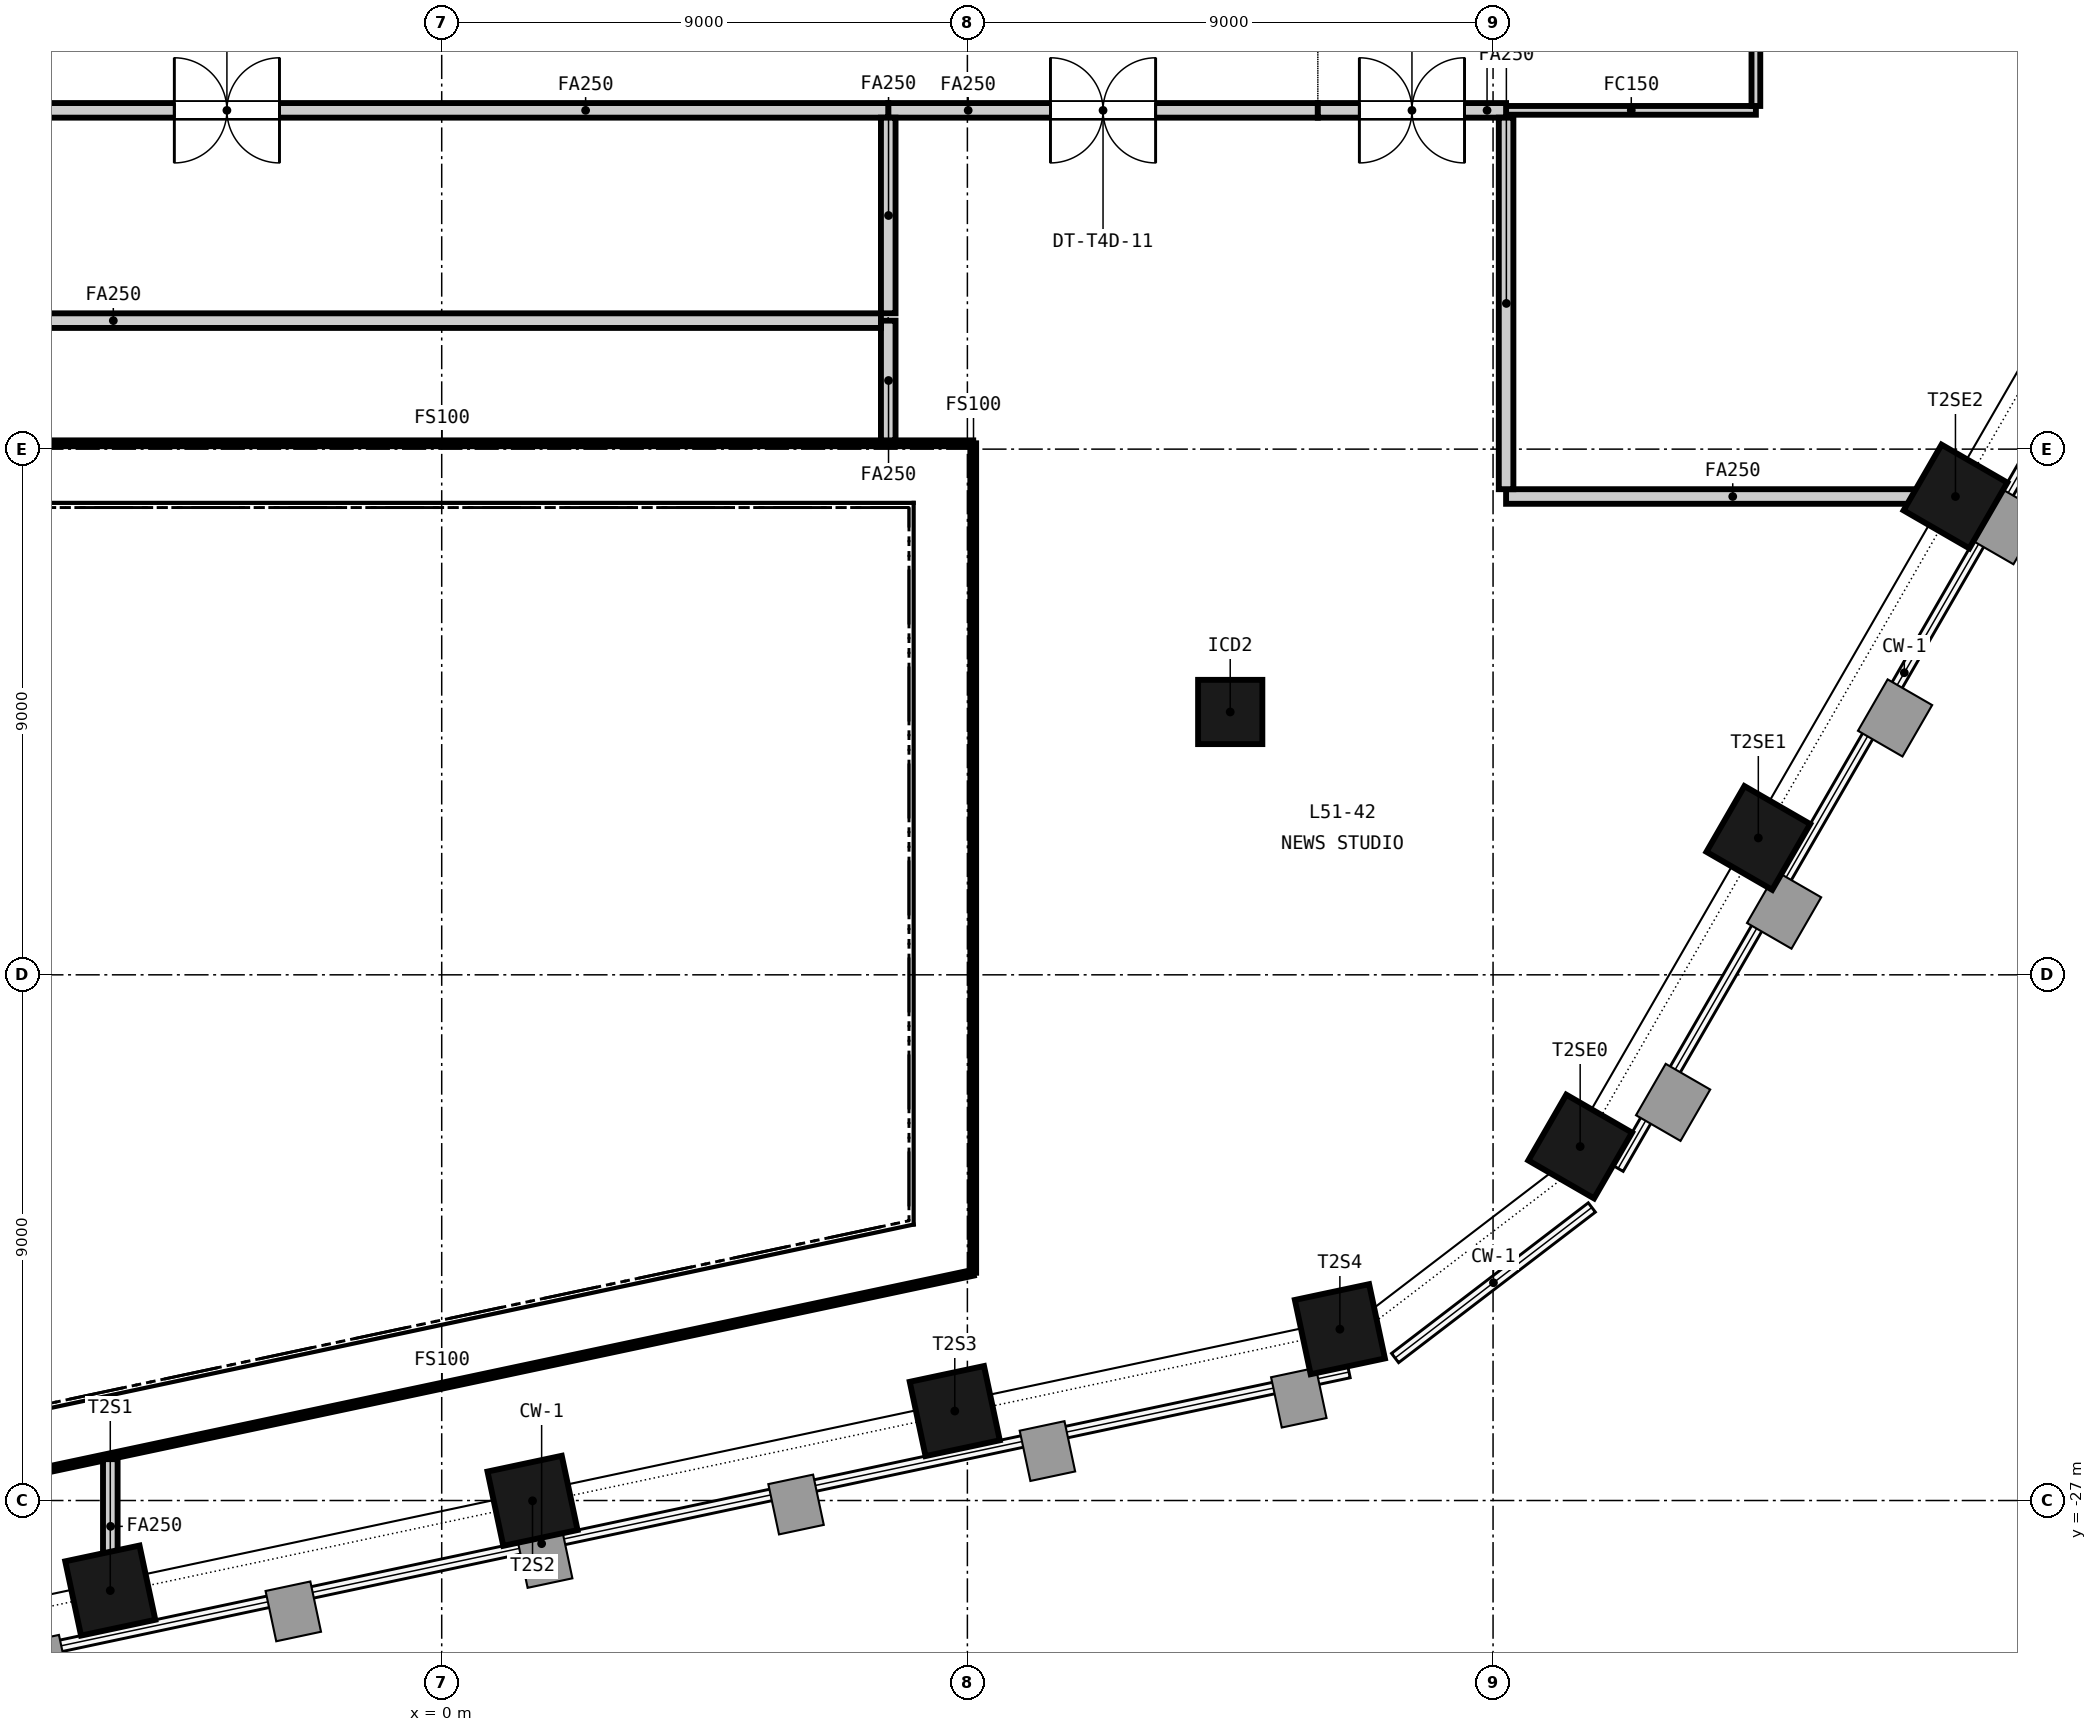
"""IFC4 building model, lengths in metres.
Left out: names, types, materials, properties, quantities, classifications, styles, units other than length and angle.
Written with IfcOpenShell. Run it as: python <this file> out.ifc"""

import sys

from ifc_helpers import new_model, si_unit, direction, frame, frame_2d, origin, origin_2d, place, context, subcontext, project, spatial, rectangle, extrude, element, fill, save


model = new_model("IFC4")
c1 = context("Model", 3, precision=1e-05, world=origin(), true_north=direction((0.0, 1.0)))
c2 = subcontext(c1, "Body", "Model", "MODEL_VIEW")
j1 = project(units=[si_unit("LENGTHUNIT", "METRE"), si_unit("PLANEANGLEUNIT", "RADIAN")], contexts=[c1])
p1 = place(None, origin())
s1 = spatial("IfcSite", under=j1, at=p1, CompositionType="ELEMENT")
p2 = place(p1, origin())
s2 = spatial("IfcBuilding", under=s1, at=p2, CompositionType="ELEMENT")
p3 = place(p2, frame((0.0, 0.0, 203.65)))
s3 = spatial("IfcBuildingStorey", under=s2, at=p3, CompositionType="ELEMENT", Elevation=203.65)
for number, where, z_axis, x_axis in (
    (1, (-5.675, -28.542, -0.15), (0.0, 0.0, 1.0), (0.978, 0.208, 0.0)),
    (2, (1.555, -27.005, -0.15), (0.0, 0.0, 1.0), (0.978, 0.208, 0.0)),
    (3, (8.784, -25.468, -0.15), (0.0, 0.0, 1.0), (0.978, 0.208, 0.0)),
    (4, (15.378, -24.067, -0.15), (0.0, 0.0, 1.0), (0.978, 0.208, 0.0)),
    (5, (19.491, -20.94, -0.15), (0.0, 0.0, 1.0), (0.5, 0.866, 0.0)),
    (6, (22.542, -15.657, -0.15), (0.0, 0.0, 1.0), (0.5, 0.866, 0.0)),
    (7, (25.917, -9.811, -0.15), (0.0, 0.0, 1.0), (0.5, 0.866, 0.0)),
):
    element("IfcColumn", number, at=place(p3, frame(where, z_axis=z_axis, x_axis=x_axis)), inside=s3, PredefinedType="COLUMN", context=c2, shape_type="SweptSolid", body=[
        extrude(rectangle(XDim=1.3, YDim=1.3, at=origin_2d()), origin(), (0.0, 0.0, 1.0), 3.5),
    ])
p4 = place(p3, frame((13.5, -13.5, -0.15), z_axis=(0.0, 0.0, 1.0), x_axis=(1.0, 0.0, 0.0)))
e8 = element("IfcColumn", 8, at=p4, inside=s3, PredefinedType="COLUMN", context=c2, shape_type="SweptSolid", body=[
    extrude(rectangle(XDim=1.1, YDim=1.1, at=origin_2d()), origin(), (0.0, 0.0, 1.0), 3.5),
])
p5 = place(p3, frame((15.0, -3.2, 0.0), z_axis=(0.0, 0.0, 1.0), x_axis=(-1.0, 0.0, 0.0)))
e9 = element("IfcWall", 9, at=p5, inside=s3, PredefinedType="PARTITIONING", context=c2, shape_type="SweptSolid", body=[
    extrude(rectangle(XDim=7.355, YDim=0.25, at=frame_2d((3.677, 0.0))), origin(), (0.0, 0.0, 1.0), 2.591),
])
p6 = place(p5, frame((2.778, 0.0, 0.0)))
e10 = element("IfcOpeningElement", 10, at=p6, cuts=e9, PredefinedType="OPENING", context=c2, shape_type="SweptSolid", body=[
    extrude(rectangle(XDim=1.8, YDim=2.1, at=frame_2d((0.9, 1.05))), frame((0.0, 0.135, 0.0), z_axis=(0.0, -1.0, 0.0), x_axis=(1.0, 0.0, 0.0)), (0.0, 0.0, 1.0), 0.27),
])
p7 = place(p3, frame((7.645, -3.2, 0.0), z_axis=(0.0, 0.0, 1.0), x_axis=(-1.0, 0.0, 0.0)))
e11 = element("IfcWall", 11, at=p7, inside=s3, PredefinedType="PARTITIONING", context=c2, shape_type="SweptSolid", body=[
    extrude(rectangle(XDim=22.645, YDim=0.25, at=frame_2d((11.323, 0.0))), origin(), (0.0, 0.0, 1.0), 2.591),
])
p8 = place(p7, frame((10.423, 0.0, 0.0)))
e12 = element("IfcOpeningElement", 12, at=p8, cuts=e11, PredefinedType="OPENING", context=c2, shape_type="SweptSolid", body=[
    extrude(rectangle(XDim=1.8, YDim=2.1, at=frame_2d((0.9, 1.05))), frame((0.0, 0.135, 0.0), z_axis=(0.0, -1.0, 0.0), x_axis=(1.0, 0.0, 0.0)), (0.0, 0.0, 1.0), 0.27),
])
p9 = place(p3, frame((22.5, -3.2, 0.0), z_axis=(0.0, 0.0, 1.0), x_axis=(-1.0, 0.0, 0.0)))
e13 = element("IfcWall", 13, at=p9, inside=s3, PredefinedType="PARTITIONING", context=c2, shape_type="SweptSolid", body=[
    extrude(rectangle(XDim=4.277, YDim=0.15, at=frame_2d((2.139, 0.0))), origin(), (0.0, 0.0, 1.0), 2.591),
])
p10 = place(p3, frame((22.5, 0.0, 0.0), z_axis=(0.0, 0.0, 1.0), x_axis=(0.0, -1.0, 0.0)))
e14 = element("IfcWall", 14, at=p10, inside=s3, PredefinedType="PARTITIONING", context=c2, shape_type="SweptSolid", body=[
    extrude(rectangle(XDim=3.125, YDim=0.15, at=frame_2d((1.562, 0.0))), origin(), (0.0, 0.0, 1.0), 2.591),
])
p11 = place(p3, frame((18.223, -3.2, 0.0), z_axis=(0.0, 0.0, 1.0), x_axis=(-1.0, 0.0, 0.0)))
e15 = element("IfcWall", 15, at=p11, inside=s3, PredefinedType="PARTITIONING", context=c2, shape_type="SweptSolid", body=[
    extrude(rectangle(XDim=3.223, YDim=0.25, at=frame_2d((1.611, 0.0))), origin(), (0.0, 0.0, 1.0), 2.591),
])
p12 = place(p11, frame((0.711, 0.0, 0.0)))
e16 = element("IfcOpeningElement", 16, at=p12, cuts=e15, PredefinedType="OPENING", context=c2, shape_type="SweptSolid", body=[
    extrude(rectangle(XDim=1.8, YDim=2.1, at=frame_2d((0.9, 1.05))), frame((0.0, 0.135, 0.0), z_axis=(0.0, -1.0, 0.0), x_axis=(1.0, 0.0, 0.0)), (0.0, 0.0, 1.0), 0.27),
])
p13 = place(p3, frame((18.223, -9.811, 0.0), z_axis=(0.0, 0.0, 1.0), x_axis=(1.0, 0.0, 0.0)))
e17 = element("IfcWall", 17, at=p13, inside=s3, PredefinedType="PARTITIONING", context=c2, shape_type="SweptSolid", body=[
    extrude(rectangle(XDim=7.751, YDim=0.25, at=frame_2d((3.875, 0.0))), origin(), (0.0, 0.0, 1.0), 2.591),
])
p14 = place(p3, frame((-5.674, -28.593, 0.0), z_axis=(0.0, 0.0, 1.0), x_axis=(0.0, 1.0, 0.0)))
e18 = element("IfcWall", 18, at=p14, inside=s3, PredefinedType="PARTITIONING", context=c2, shape_type="SweptSolid", body=[
    extrude(rectangle(XDim=2.301, YDim=0.25, at=frame_2d((1.15, 0.0))), origin(), (0.0, 0.0, 1.0), 2.591),
])
p15 = place(p3, frame((7.645, -8.85, 0.0), z_axis=(0.0, 0.0, 1.0), x_axis=(0.0, 1.0, 0.0)))
e19 = element("IfcWall", 19, at=p15, inside=s3, PredefinedType="PARTITIONING", context=c2, shape_type="SweptSolid", body=[
    extrude(rectangle(XDim=2.05, YDim=0.25, at=frame_2d((1.025, 0.0))), origin(), (0.0, 0.0, 1.0), 2.591),
])
p16 = place(p3, frame((18.223, -9.686, 0.0), z_axis=(0.0, 0.0, 1.0), x_axis=(0.0, 1.0, 0.0)))
e20 = element("IfcWall", 20, at=p16, inside=s3, PredefinedType="PARTITIONING", context=c2, shape_type="SweptSolid", body=[
    extrude(rectangle(XDim=6.361, YDim=0.25, at=frame_2d((3.181, 0.0))), origin(), (0.0, 0.0, 1.0), 2.591),
])
p17 = place(p3, frame((-18.775, -6.8, 0.0), z_axis=(0.0, 0.0, 1.0), x_axis=(1.0, 0.0, 0.0)))
e21 = element("IfcWall", 21, at=p17, inside=s3, PredefinedType="PARTITIONING", context=c2, shape_type="SweptSolid", body=[
    extrude(rectangle(XDim=26.295, YDim=0.25, at=frame_2d((13.147, 0.0))), origin(), (0.0, 0.0, 1.0), 2.591),
])
p18 = place(p3, frame((7.645, -6.675, 0.0), z_axis=(0.0, 0.0, 1.0), x_axis=(0.0, 1.0, 0.0)))
e22 = element("IfcWall", 22, at=p18, inside=s3, PredefinedType="PARTITIONING", context=c2, shape_type="SweptSolid", body=[
    extrude(rectangle(XDim=3.35, YDim=0.25, at=frame_2d((1.675, 0.0))), origin(), (0.0, 0.0, 1.0), 2.591),
])
p19 = place(p3, frame((-9.1, -8.9, 0.0), z_axis=(0.0, 0.0, 1.0), x_axis=(1.0, 0.0, 0.0)))
e23 = element("IfcWall", 23, at=p19, inside=s3, PredefinedType="PARTITIONING", context=c2, shape_type="SweptSolid", body=[
    extrude(rectangle(XDim=18.2, YDim=0.1, at=frame_2d((9.1, 0.0))), origin(), (0.0, 0.0, 1.0), 2.591),
])
p20 = place(p3, frame((9.1, -8.9, 0.0), z_axis=(0.0, 0.0, 1.0), x_axis=(0.0, -1.0, 0.0)))
e24 = element("IfcWall", 24, at=p20, inside=s3, PredefinedType="PARTITIONING", context=c2, shape_type="SweptSolid", body=[
    extrude(rectangle(XDim=14.201, YDim=0.1, at=frame_2d((7.101, 0.0))), origin(), (0.0, 0.0, 1.0), 2.591),
])
p21 = place(p3, frame((9.1, -23.101, 0.0), z_axis=(0.0, 0.0, 1.0), x_axis=(-0.978146710971, -0.207915876778, 0.0)))
e25 = element("IfcWall", 25, at=p21, inside=s3, PredefinedType="PARTITIONING", context=c2, shape_type="SweptSolid", body=[
    extrude(rectangle(XDim=18.607, YDim=0.1, at=frame_2d((9.303, 0.0))), origin(), (0.0, 0.0, 1.0), 2.591),
])
p22 = place(p6, origin())
e26 = element("IfcDoor", 26, at=p22, inside=s3, OperationType="DOUBLE_DOOR_DOUBLE_SWING", PredefinedType="DOOR", context=c2, shape_type="SweptSolid", body=[
    extrude(rectangle(XDim=1.8, YDim=2.1, at=frame_2d((0.9, 1.05))), frame((0.0, 0.025, 0.0), z_axis=(0.0, -1.0, 0.0), x_axis=(1.0, 0.0, 0.0)), (0.0, 0.0, 1.0), 0.05),
])
fill(e10, e26)
p23 = place(p12, origin())
e27 = element("IfcDoor", 27, at=p23, inside=s3, OperationType="DOUBLE_DOOR_DOUBLE_SWING", PredefinedType="DOOR", context=c2, shape_type="SweptSolid", body=[
    extrude(rectangle(XDim=1.8, YDim=2.1, at=frame_2d((0.9, 1.05))), frame((0.0, 0.025, 0.0), z_axis=(0.0, -1.0, 0.0), x_axis=(1.0, 0.0, 0.0)), (0.0, 0.0, 1.0), 0.05),
])
fill(e16, e27)
p24 = place(p8, origin())
e28 = element("IfcDoor", 28, at=p24, inside=s3, OperationType="DOUBLE_DOOR_DOUBLE_SWING", PredefinedType="DOOR", context=c2, shape_type="SweptSolid", body=[
    extrude(rectangle(XDim=1.8, YDim=2.1, at=frame_2d((0.9, 1.05))), frame((0.0, 0.025, 0.0), z_axis=(0.0, -1.0, 0.0), x_axis=(1.0, 0.0, 0.0)), (0.0, 0.0, 1.0), 0.05),
])
fill(e12, e28)
save(model, sys.argv[1])
